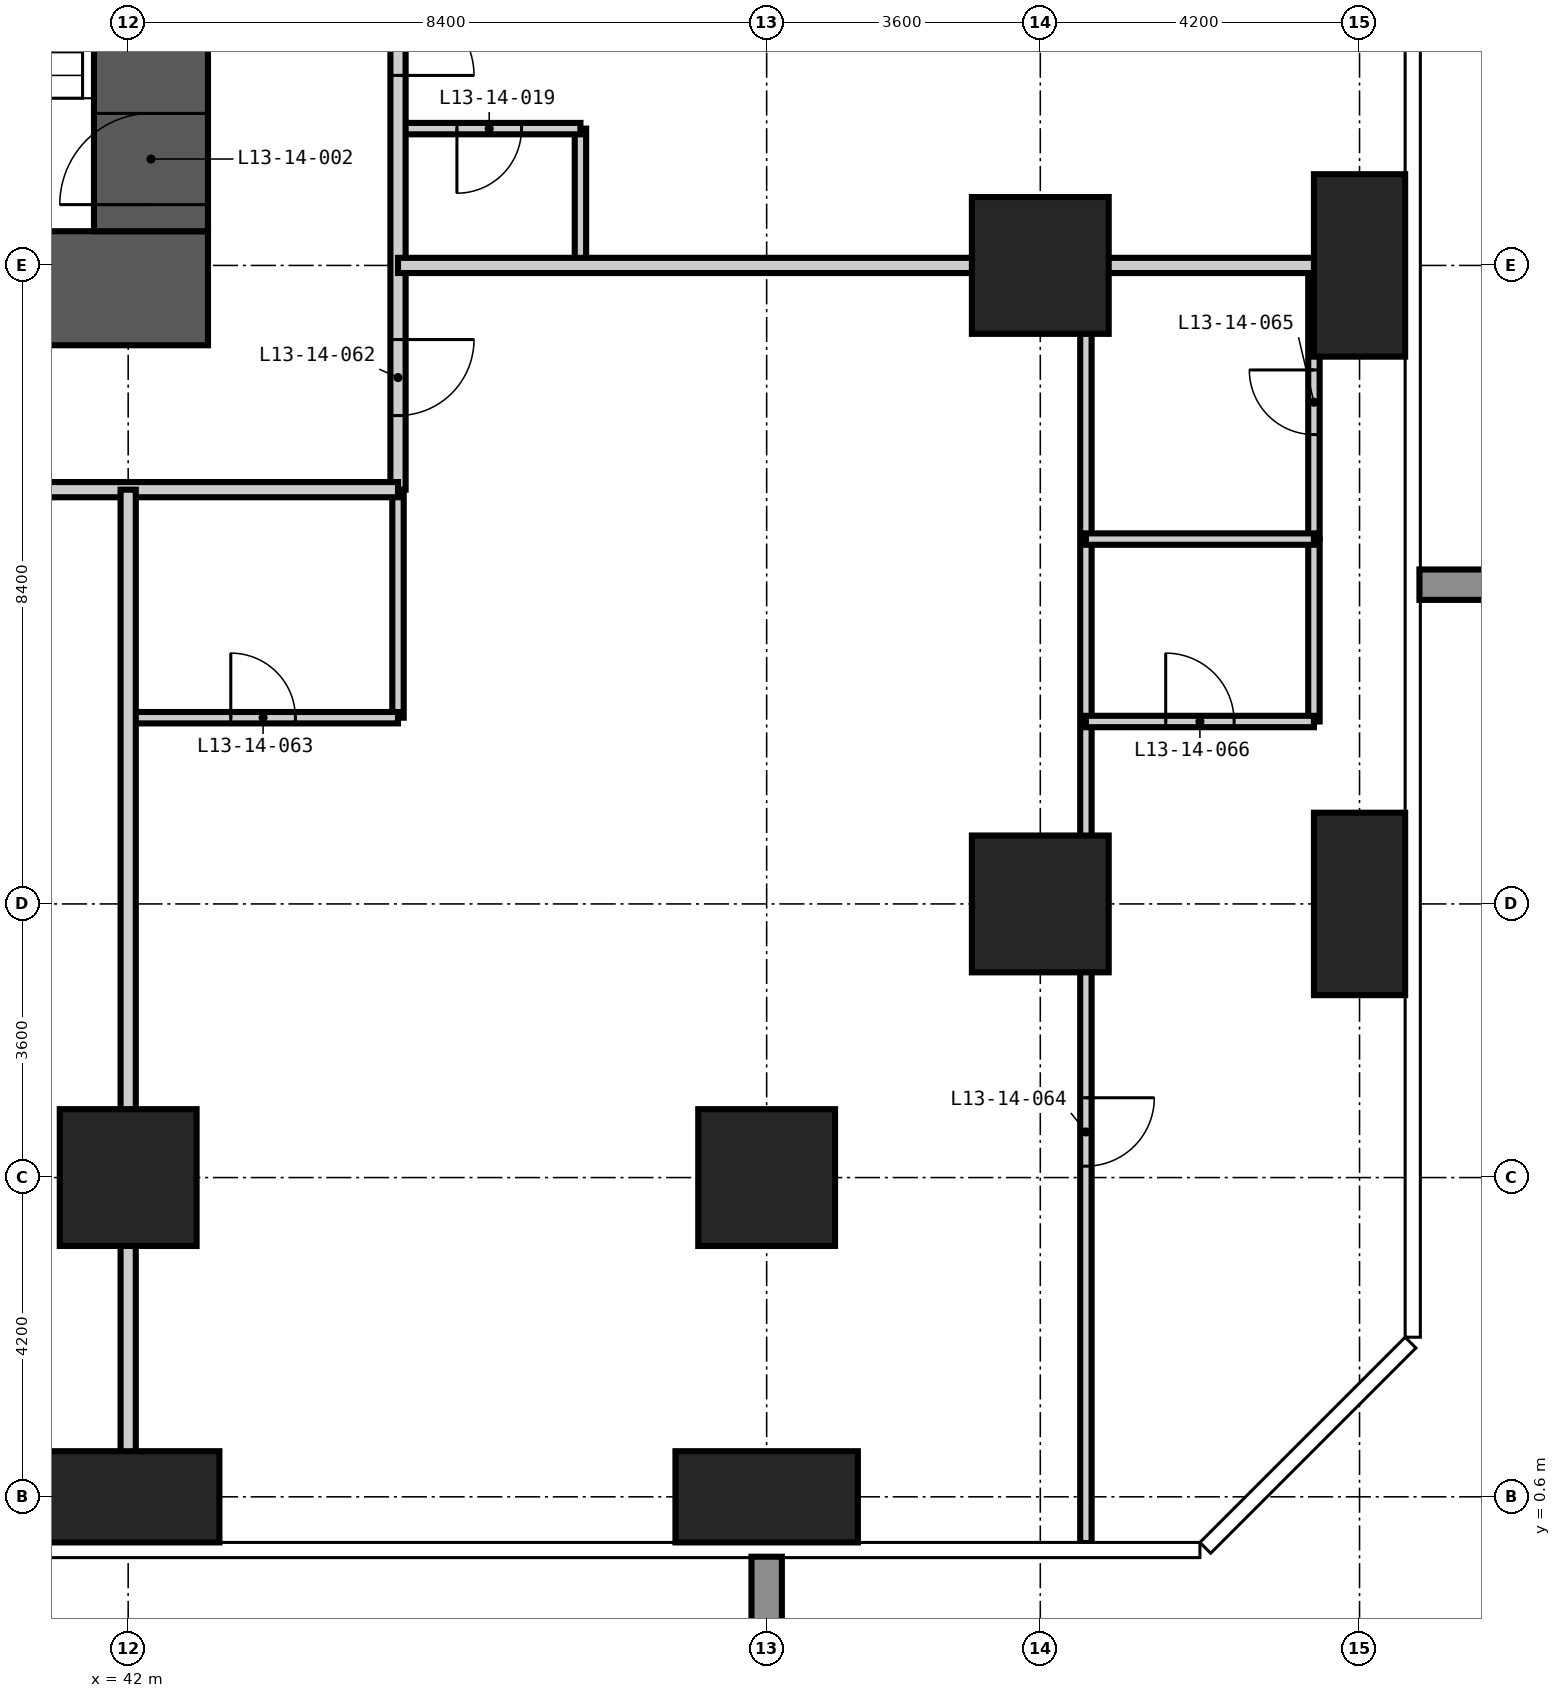
"""IFC4 building model, lengths in metres.
Left out: names, types, materials, properties, quantities, classifications, styles, units other than length and angle.
Written with IfcOpenShell. Run it as: python <this file> out.ifc"""

import sys

from ifc_helpers import new_model, si_unit, direction, frame, frame_2d, origin, origin_2d, place, context, subcontext, project, spatial, rectangle, extrude, element, fill, save


model = new_model("IFC4")
c1 = context("Model", 3, precision=1e-05, world=origin(), true_north=direction((0.0, 1.0)))
c2 = subcontext(c1, "Body", "Model", "MODEL_VIEW")
j1 = project(units=[si_unit("LENGTHUNIT", "METRE"), si_unit("PLANEANGLEUNIT", "RADIAN")], contexts=[c1])
p1 = place(None, origin())
s1 = spatial("IfcSite", under=j1, at=p1, CompositionType="ELEMENT")
p2 = place(p1, origin())
s2 = spatial("IfcBuilding", under=s1, at=p2, CompositionType="ELEMENT")
p3 = place(p2, frame((0.0, 0.0, 55.8)))
s3 = spatial("IfcBuildingStorey", under=s2, at=p3, CompositionType="ELEMENT", Elevation=55.8)
p4 = place(p3, frame((42.0, 0.6, -0.35), z_axis=(0.0, 0.0, 1.0), x_axis=(1.0, 0.0, 0.0)))
e1 = element("IfcColumn", 1, at=p4, inside=s3, PredefinedType="COLUMN", context=c2, shape_type="SweptSolid", body=[
    extrude(rectangle(XDim=2.4, YDim=1.2, at=origin_2d()), origin(), (0.0, 0.0, 1.0), 3.6),
])
p5 = place(p3, frame((42.0, 4.8, -0.35), z_axis=(0.0, 0.0, 1.0), x_axis=(1.0, 0.0, 0.0)))
e2 = element("IfcColumn", 2, at=p5, inside=s3, PredefinedType="COLUMN", context=c2, shape_type="SweptSolid", body=[
    extrude(rectangle(XDim=1.8, YDim=1.8, at=origin_2d()), origin(), (0.0, 0.0, 1.0), 3.6),
])
p6 = place(p3, frame((50.4, 0.6, -0.35), z_axis=(0.0, 0.0, 1.0), x_axis=(1.0, 0.0, 0.0)))
e3 = element("IfcColumn", 3, at=p6, inside=s3, PredefinedType="COLUMN", context=c2, shape_type="SweptSolid", body=[
    extrude(rectangle(XDim=2.4, YDim=1.2, at=origin_2d()), origin(), (0.0, 0.0, 1.0), 3.6),
])
for number, where, z_axis, x_axis in (
    (4, (50.4, 4.8, -0.35), (0.0, 0.0, 1.0), (1.0, 0.0, 0.0)),
    (5, (54.0, 8.4, -0.35), (0.0, 0.0, 1.0), (1.0, 0.0, 0.0)),
    (6, (54.0, 16.8, -0.35), (0.0, 0.0, 1.0), (1.0, 0.0, 0.0)),
):
    element("IfcColumn", number, at=place(p3, frame(where, z_axis=z_axis, x_axis=x_axis)), inside=s3, PredefinedType="COLUMN", context=c2, shape_type="SweptSolid", body=[
        extrude(rectangle(XDim=1.8, YDim=1.8, at=origin_2d()), origin(), (0.0, 0.0, 1.0), 3.6),
    ])
for number, where, z_axis, x_axis in (
    (7, (58.2, 8.4, -0.35), (0.0, 0.0, 1.0), (1.0, 0.0, 0.0)),
    (8, (58.2, 16.8, -0.35), (0.0, 0.0, 1.0), (1.0, 0.0, 0.0)),
):
    element("IfcColumn", number, at=place(p3, frame(where, z_axis=z_axis, x_axis=x_axis)), inside=s3, PredefinedType="COLUMN", context=c2, shape_type="SweptSolid", body=[
        extrude(rectangle(XDim=1.2, YDim=2.4, at=origin_2d()), origin(), (0.0, 0.0, 1.0), 3.6),
    ])
p7 = place(p3, frame((15.75, 16.5, -0.35), z_axis=(0.0, 0.0, 1.0), x_axis=(1.0, 0.0, 0.0)))
e9 = element("IfcWall", 9, at=p7, inside=s3, PredefinedType="SHEAR", context=c2, shape_type="SweptSolid", body=[
    extrude(rectangle(XDim=27.3, YDim=1.5, at=frame_2d((13.65, 0.0))), origin(), (0.0, 0.0, 1.0), 3.6),
])
p8 = place(p7, frame((13.15, 0.0, 0.35)))
e10 = element("IfcOpeningElement", 10, at=p8, cuts=e9, PredefinedType="OPENING", context=c2, shape_type="SweptSolid", body=[
    extrude(rectangle(XDim=1.0, YDim=2.1, at=frame_2d((0.5, 1.05))), frame((0.0, 0.76, 0.0), z_axis=(0.0, -1.0, 0.0), x_axis=(1.0, 0.0, 0.0)), (0.0, 0.0, 1.0), 1.52),
])
p9 = place(p7, frame((19.45, 0.0, 0.35)))
e11 = element("IfcOpeningElement", 11, at=p9, cuts=e9, PredefinedType="OPENING", context=c2, shape_type="SweptSolid", body=[
    extrude(rectangle(XDim=1.0, YDim=2.1, at=frame_2d((0.5, 1.05))), frame((0.0, 0.76, 0.0), z_axis=(0.0, -1.0, 0.0), x_axis=(1.0, 0.0, 0.0)), (0.0, 0.0, 1.0), 1.52),
])
p10 = place(p3, frame((42.3, 17.25, -0.35), z_axis=(0.0, 0.0, 1.0), x_axis=(0.0, 1.0, 0.0)))
e12 = element("IfcWall", 12, at=p10, inside=s3, PredefinedType="SHEAR", context=c2, shape_type="SweptSolid", body=[
    extrude(rectangle(XDim=24.3, YDim=1.5, at=frame_2d((12.15, 0.0))), origin(), (0.0, 0.0, 1.0), 3.6),
])
p11 = place(p10, frame((0.35, 0.0, 0.35)))
e13 = element("IfcOpeningElement", 13, at=p11, cuts=e12, PredefinedType="OPENING", context=c2, shape_type="SweptSolid", body=[
    extrude(rectangle(XDim=1.2, YDim=2.2, at=frame_2d((0.6, 1.1))), frame((0.0, 0.76, 0.0), z_axis=(0.0, -1.0, 0.0), x_axis=(1.0, 0.0, 0.0)), (0.0, 0.0, 1.0), 1.52),
])
p12 = place(p10, frame((11.65, 0.0, 0.35)))
e14 = element("IfcOpeningElement", 14, at=p12, cuts=e12, PredefinedType="OPENING", context=c2, shape_type="SweptSolid", body=[
    extrude(rectangle(XDim=1.0, YDim=2.1, at=frame_2d((0.5, 1.05))), frame((0.0, 0.76, 0.0), z_axis=(0.0, -1.0, 0.0), x_axis=(1.0, 0.0, 0.0)), (0.0, 0.0, 1.0), 1.52),
])
p13 = place(p10, frame((20.05, 0.0, 0.35)))
e15 = element("IfcOpeningElement", 15, at=p13, cuts=e12, PredefinedType="OPENING", context=c2, shape_type="SweptSolid", body=[
    extrude(rectangle(XDim=1.0, YDim=2.1, at=frame_2d((0.5, 1.05))), frame((0.0, 0.76, 0.0), z_axis=(0.0, -1.0, 0.0), x_axis=(1.0, 0.0, 0.0)), (0.0, 0.0, 1.0), 1.52),
])
p14 = place(p3, frame((45.55, 10.85, 0.0), z_axis=(0.0, 0.0, 1.0), x_axis=(0.0, 1.0, 0.0)))
e16 = element("IfcWall", 16, at=p14, inside=s3, PredefinedType="PARTITIONING", context=c2, shape_type="SweptSolid", body=[
    extrude(rectangle(XDim=3.0, YDim=0.15, at=frame_2d((1.5, 0.0))), origin(), (0.0, 0.0, 1.0), 3.25),
])
p15 = place(p3, frame((47.95, 16.8, 0.0), z_axis=(0.0, 0.0, 1.0), x_axis=(0.0, 1.0, 0.0)))
e17 = element("IfcWall", 17, at=p15, inside=s3, PredefinedType="PARTITIONING", context=c2, shape_type="SweptSolid", body=[
    extrude(rectangle(XDim=1.8, YDim=0.15, at=frame_2d((0.9, 0.0))), origin(), (0.0, 0.0, 1.0), 3.25),
])
p16 = place(p3, frame((57.6, 13.2, 0.0), z_axis=(0.0, 0.0, 1.0), x_axis=(0.0, 1.0, 0.0)))
e18 = element("IfcWall", 18, at=p16, inside=s3, PredefinedType="PARTITIONING", context=c2, shape_type="SweptSolid", body=[
    extrude(rectangle(XDim=3.6, YDim=0.15, at=frame_2d((1.8, 0.0))), origin(), (0.0, 0.0, 1.0), 3.25),
])
p17 = place(p16, frame((1.375, 0.0, 0.0)))
e19 = element("IfcOpeningElement", 19, at=p17, cuts=e18, PredefinedType="OPENING", context=c2, shape_type="SweptSolid", body=[
    extrude(rectangle(XDim=0.85, YDim=2.1, at=frame_2d((0.425, 1.05))), frame((0.0, 0.085, 0.0), z_axis=(0.0, -1.0, 0.0), x_axis=(1.0, 0.0, 0.0)), (0.0, 0.0, 1.0), 0.17),
])
p18 = place(p3, frame((42.0, 10.85, 0.0), z_axis=(0.0, 0.0, 1.0), x_axis=(1.0, 0.0, 0.0)))
e20 = element("IfcWall", 20, at=p18, inside=s3, PredefinedType="PARTITIONING", context=c2, shape_type="SweptSolid", body=[
    extrude(rectangle(XDim=3.55, YDim=0.15, at=frame_2d((1.775, 0.0))), origin(), (0.0, 0.0, 1.0), 3.25),
])
p19 = place(p18, frame((1.35, 0.0, 0.0)))
e21 = element("IfcOpeningElement", 21, at=p19, cuts=e20, PredefinedType="OPENING", context=c2, shape_type="SweptSolid", body=[
    extrude(rectangle(XDim=0.85, YDim=2.1, at=frame_2d((0.425, 1.05))), frame((0.0, 0.085, 0.0), z_axis=(0.0, -1.0, 0.0), x_axis=(1.0, 0.0, 0.0)), (0.0, 0.0, 1.0), 0.17),
])
p20 = place(p3, frame((45.55, 18.6, 0.0), z_axis=(0.0, 0.0, 1.0), x_axis=(1.0, 0.0, 0.0)))
e22 = element("IfcWall", 22, at=p20, inside=s3, PredefinedType="PARTITIONING", context=c2, shape_type="SweptSolid", body=[
    extrude(rectangle(XDim=2.4, YDim=0.15, at=frame_2d((1.2, 0.0))), origin(), (0.0, 0.0, 1.0), 3.25),
])
p21 = place(p20, frame((0.775, 0.0, 0.0)))
e23 = element("IfcOpeningElement", 23, at=p21, cuts=e22, PredefinedType="OPENING", context=c2, shape_type="SweptSolid", body=[
    extrude(rectangle(XDim=0.85, YDim=2.1, at=frame_2d((0.425, 1.05))), frame((0.0, 0.085, 0.0), z_axis=(0.0, -1.0, 0.0), x_axis=(1.0, 0.0, 0.0)), (0.0, 0.0, 1.0), 0.17),
])
p22 = place(p3, frame((45.55, 46.15, 0.0), z_axis=(0.0, 0.0, 1.0), x_axis=(0.0, -1.0, 0.0)))
e24 = element("IfcWall", 24, at=p22, inside=s3, PredefinedType="PARTITIONING", context=c2, shape_type="SweptSolid", body=[
    extrude(rectangle(XDim=32.3, YDim=0.2, at=frame_2d((16.15, 0.0))), origin(), (0.0, 0.0, 1.0), 3.25),
])
p23 = place(p22, frame((25.85, 0.0, 0.0)))
e25 = element("IfcOpeningElement", 25, at=p23, cuts=e24, PredefinedType="OPENING", context=c2, shape_type="SweptSolid", body=[
    extrude(rectangle(XDim=1.0, YDim=2.2, at=frame_2d((0.5, 1.1))), frame((0.0, 0.11, 0.0), z_axis=(0.0, -1.0, 0.0), x_axis=(1.0, 0.0, 0.0)), (0.0, 0.0, 1.0), 0.22),
])
p24 = place(p22, frame((17.45, 0.0, 0.0)))
e26 = element("IfcOpeningElement", 26, at=p24, cuts=e24, PredefinedType="OPENING", context=c2, shape_type="SweptSolid", body=[
    extrude(rectangle(XDim=1.0, YDim=2.2, at=frame_2d((0.5, 1.1))), frame((0.0, 0.11, 0.0), z_axis=(0.0, -1.0, 0.0), x_axis=(1.0, 0.0, 0.0)), (0.0, 0.0, 1.0), 0.22),
])
p25 = place(p22, frame((9.05, 0.0, 0.0)))
e27 = element("IfcOpeningElement", 27, at=p25, cuts=e24, PredefinedType="OPENING", context=c2, shape_type="SweptSolid", body=[
    extrude(rectangle(XDim=1.0, YDim=2.2, at=frame_2d((0.5, 1.1))), frame((0.0, 0.11, 0.0), z_axis=(0.0, -1.0, 0.0), x_axis=(1.0, 0.0, 0.0)), (0.0, 0.0, 1.0), 0.22),
])
p26 = place(p22, frame((30.325, 0.0, 0.0)))
e28 = element("IfcOpeningElement", 28, at=p26, cuts=e24, PredefinedType="OPENING", context=c2, shape_type="SweptSolid", body=[
    extrude(rectangle(XDim=1.0, YDim=2.2, at=frame_2d((0.5, 1.1))), frame((0.0, 0.11, 0.0), z_axis=(0.0, -1.0, 0.0), x_axis=(1.0, 0.0, 0.0)), (0.0, 0.0, 1.0), 0.22),
])
p27 = place(p22, frame((1.575, 0.0, 0.0)))
e29 = element("IfcOpeningElement", 29, at=p27, cuts=e24, PredefinedType="OPENING", context=c2, shape_type="SweptSolid", body=[
    extrude(rectangle(XDim=1.0, YDim=2.2, at=frame_2d((0.5, 1.1))), frame((0.0, 0.11, 0.0), z_axis=(0.0, -1.0, 0.0), x_axis=(1.0, 0.0, 0.0)), (0.0, 0.0, 1.0), 0.22),
])
p28 = place(p3, frame((45.55, 13.85, 0.0), z_axis=(0.0, 0.0, 1.0), x_axis=(-1.0, 0.0, 0.0)))
e30 = element("IfcWall", 30, at=p28, inside=s3, PredefinedType="PARTITIONING", context=c2, shape_type="SweptSolid", body=[
    extrude(rectangle(XDim=31.7, YDim=0.2, at=frame_2d((15.85, 0.0))), origin(), (0.0, 0.0, 1.0), 3.25),
])
p29 = place(p28, frame((24.05, 0.0, 0.0)))
e31 = element("IfcOpeningElement", 31, at=p29, cuts=e30, PredefinedType="OPENING", context=c2, shape_type="SweptSolid", body=[
    extrude(rectangle(XDim=1.0, YDim=2.2, at=frame_2d((0.5, 1.1))), frame((0.0, 0.11, 0.0), z_axis=(0.0, -1.0, 0.0), x_axis=(1.0, 0.0, 0.0)), (0.0, 0.0, 1.0), 0.22),
])
p30 = place(p28, frame((15.65, 0.0, 0.0)))
e32 = element("IfcOpeningElement", 32, at=p30, cuts=e30, PredefinedType="OPENING", context=c2, shape_type="SweptSolid", body=[
    extrude(rectangle(XDim=1.0, YDim=2.2, at=frame_2d((0.5, 1.1))), frame((0.0, 0.11, 0.0), z_axis=(0.0, -1.0, 0.0), x_axis=(1.0, 0.0, 0.0)), (0.0, 0.0, 1.0), 0.22),
])
p31 = place(p28, frame((7.25, 0.0, 0.0)))
e33 = element("IfcOpeningElement", 33, at=p31, cuts=e30, PredefinedType="OPENING", context=c2, shape_type="SweptSolid", body=[
    extrude(rectangle(XDim=1.0, YDim=2.2, at=frame_2d((0.5, 1.1))), frame((0.0, 0.11, 0.0), z_axis=(0.0, -1.0, 0.0), x_axis=(1.0, 0.0, 0.0)), (0.0, 0.0, 1.0), 0.22),
])
p32 = place(p3, frame((42.0, -0.008, 0.0), z_axis=(0.0, 0.0, 1.0), x_axis=(0.0, 1.0, 0.0)))
e34 = element("IfcWall", 34, at=p32, inside=s3, PredefinedType="PARTITIONING", context=c2, shape_type="SweptSolid", body=[
    extrude(rectangle(XDim=13.858, YDim=0.2, at=frame_2d((6.929, 0.0))), origin(), (0.0, 0.0, 1.0), 3.25),
])
p33 = place(p3, frame((45.55, 16.8, 0.0), z_axis=(0.0, 0.0, 1.0), x_axis=(1.0, 0.0, 0.0)))
e35 = element("IfcWall", 35, at=p33, inside=s3, PredefinedType="PARTITIONING", context=c2, shape_type="SweptSolid", body=[
    extrude(rectangle(XDim=13.258, YDim=0.2, at=frame_2d((6.629, 0.0))), origin(), (0.0, 0.0, 1.0), 3.25),
])
p34 = place(p3, frame((54.6, -0.008, 0.0), z_axis=(0.0, 0.0, 1.0), x_axis=(0.0, 1.0, 0.0)))
e36 = element("IfcWall", 36, at=p34, inside=s3, PredefinedType="PARTITIONING", context=c2, shape_type="SweptSolid", body=[
    extrude(rectangle(XDim=16.808, YDim=0.15, at=frame_2d((8.404, 0.0))), origin(), (0.0, 0.0, 1.0), 3.25),
])
p35 = place(p34, frame((4.958, 0.0, 0.0)))
e37 = element("IfcOpeningElement", 37, at=p35, cuts=e36, PredefinedType="OPENING", context=c2, shape_type="SweptSolid", body=[
    extrude(rectangle(XDim=0.9, YDim=2.1, at=frame_2d((0.45, 1.05))), frame((0.0, 0.085, 0.0), z_axis=(0.0, -1.0, 0.0), x_axis=(1.0, 0.0, 0.0)), (0.0, 0.0, 1.0), 0.17),
])
p36 = place(p3, frame((57.6, 10.8, 0.0), z_axis=(0.0, 0.0, 1.0), x_axis=(0.0, 1.0, 0.0)))
e38 = element("IfcWall", 38, at=p36, inside=s3, PredefinedType="PARTITIONING", context=c2, shape_type="SweptSolid", body=[
    extrude(rectangle(XDim=2.4, YDim=0.15, at=frame_2d((1.2, 0.0))), origin(), (0.0, 0.0, 1.0), 3.25),
])
p37 = place(p3, frame((54.6, 10.8, 0.0), z_axis=(0.0, 0.0, 1.0), x_axis=(1.0, 0.0, 0.0)))
e39 = element("IfcWall", 39, at=p37, inside=s3, PredefinedType="PARTITIONING", context=c2, shape_type="SweptSolid", body=[
    extrude(rectangle(XDim=3.0, YDim=0.15, at=frame_2d((1.5, 0.0))), origin(), (0.0, 0.0, 1.0), 3.25),
])
p38 = place(p37, frame((1.05, 0.0, 0.0)))
e40 = element("IfcOpeningElement", 40, at=p38, cuts=e39, PredefinedType="OPENING", context=c2, shape_type="SweptSolid", body=[
    extrude(rectangle(XDim=0.9, YDim=2.1, at=frame_2d((0.45, 1.05))), frame((0.0, 0.085, 0.0), z_axis=(0.0, -1.0, 0.0), x_axis=(1.0, 0.0, 0.0)), (0.0, 0.0, 1.0), 0.17),
])
p39 = place(p3, frame((54.6, 13.2, 0.0), z_axis=(0.0, 0.0, 1.0), x_axis=(1.0, 0.0, 0.0)))
e41 = element("IfcWall", 41, at=p39, inside=s3, PredefinedType="PARTITIONING", context=c2, shape_type="SweptSolid", body=[
    extrude(rectangle(XDim=3.0, YDim=0.15, at=frame_2d((1.5, 0.0))), origin(), (0.0, 0.0, 1.0), 3.25),
])
p40 = place(p11, origin())
e42 = element("IfcDoor", 42, at=p40, inside=s3, OperationType="SINGLE_SWING_LEFT", PredefinedType="DOOR", context=c2, shape_type="SweptSolid", body=[
    extrude(rectangle(XDim=1.2, YDim=2.2, at=frame_2d((0.6, 1.1))), frame((0.0, 0.025, 0.0), z_axis=(0.0, -1.0, 0.0), x_axis=(1.0, 0.0, 0.0)), (0.0, 0.0, 1.0), 0.05),
])
fill(e13, e42)
p41 = place(p23, origin())
e43 = element("IfcDoor", 43, at=p41, inside=s3, OperationType="SINGLE_SWING_RIGHT", PredefinedType="DOOR", context=c2, shape_type="SweptSolid", body=[
    extrude(rectangle(XDim=1.0, YDim=2.2, at=frame_2d((0.5, 1.1))), frame((0.0, 0.025, 0.0), z_axis=(0.0, -1.0, 0.0), x_axis=(1.0, 0.0, 0.0)), (0.0, 0.0, 1.0), 0.05),
])
fill(e25, e43)
p42 = place(p21, frame((0.85, 0.0, 0.0), z_axis=(0.0, 0.0, 1.0), x_axis=(-1.0, 0.0, 0.0)))
e44 = element("IfcDoor", 44, at=p42, inside=s3, OperationType="SINGLE_SWING_RIGHT", PredefinedType="DOOR", context=c2, shape_type="SweptSolid", body=[
    extrude(rectangle(XDim=0.85, YDim=2.1, at=frame_2d((0.425, 1.05))), frame((0.0, 0.025, 0.0), z_axis=(0.0, -1.0, 0.0), x_axis=(1.0, 0.0, 0.0)), (0.0, 0.0, 1.0), 0.05),
])
fill(e23, e44)
p43 = place(p26, origin())
e45 = element("IfcDoor", 45, at=p43, inside=s3, OperationType="SINGLE_SWING_LEFT", PredefinedType="DOOR", context=c2, shape_type="SweptSolid", body=[
    extrude(rectangle(XDim=1.0, YDim=2.2, at=frame_2d((0.5, 1.1))), frame((0.0, 0.025, 0.0), z_axis=(0.0, -1.0, 0.0), x_axis=(1.0, 0.0, 0.0)), (0.0, 0.0, 1.0), 0.05),
])
fill(e28, e45)
p44 = place(p19, origin())
e46 = element("IfcDoor", 46, at=p44, inside=s3, OperationType="SINGLE_SWING_LEFT", PredefinedType="DOOR", context=c2, shape_type="SweptSolid", body=[
    extrude(rectangle(XDim=0.85, YDim=2.1, at=frame_2d((0.425, 1.05))), frame((0.0, 0.025, 0.0), z_axis=(0.0, -1.0, 0.0), x_axis=(1.0, 0.0, 0.0)), (0.0, 0.0, 1.0), 0.05),
])
fill(e21, e46)
p45 = place(p35, frame((0.9, 0.0, 0.0), z_axis=(0.0, 0.0, 1.0), x_axis=(-1.0, 0.0, 0.0)))
e47 = element("IfcDoor", 47, at=p45, inside=s3, OperationType="SINGLE_SWING_LEFT", PredefinedType="DOOR", context=c2, shape_type="SweptSolid", body=[
    extrude(rectangle(XDim=0.9, YDim=2.1, at=frame_2d((0.45, 1.05))), frame((0.0, 0.025, 0.0), z_axis=(0.0, -1.0, 0.0), x_axis=(1.0, 0.0, 0.0)), (0.0, 0.0, 1.0), 0.05),
])
fill(e37, e47)
p46 = place(p17, origin())
e48 = element("IfcDoor", 48, at=p46, inside=s3, OperationType="SINGLE_SWING_RIGHT", PredefinedType="DOOR", context=c2, shape_type="SweptSolid", body=[
    extrude(rectangle(XDim=0.85, YDim=2.1, at=frame_2d((0.425, 1.05))), frame((0.0, 0.025, 0.0), z_axis=(0.0, -1.0, 0.0), x_axis=(1.0, 0.0, 0.0)), (0.0, 0.0, 1.0), 0.05),
])
fill(e19, e48)
p47 = place(p38, origin())
e49 = element("IfcDoor", 49, at=p47, inside=s3, OperationType="SINGLE_SWING_LEFT", PredefinedType="DOOR", context=c2, shape_type="SweptSolid", body=[
    extrude(rectangle(XDim=0.9, YDim=2.1, at=frame_2d((0.45, 1.05))), frame((0.0, 0.025, 0.0), z_axis=(0.0, -1.0, 0.0), x_axis=(1.0, 0.0, 0.0)), (0.0, 0.0, 1.0), 0.05),
])
fill(e40, e49)
save(model, sys.argv[1])
